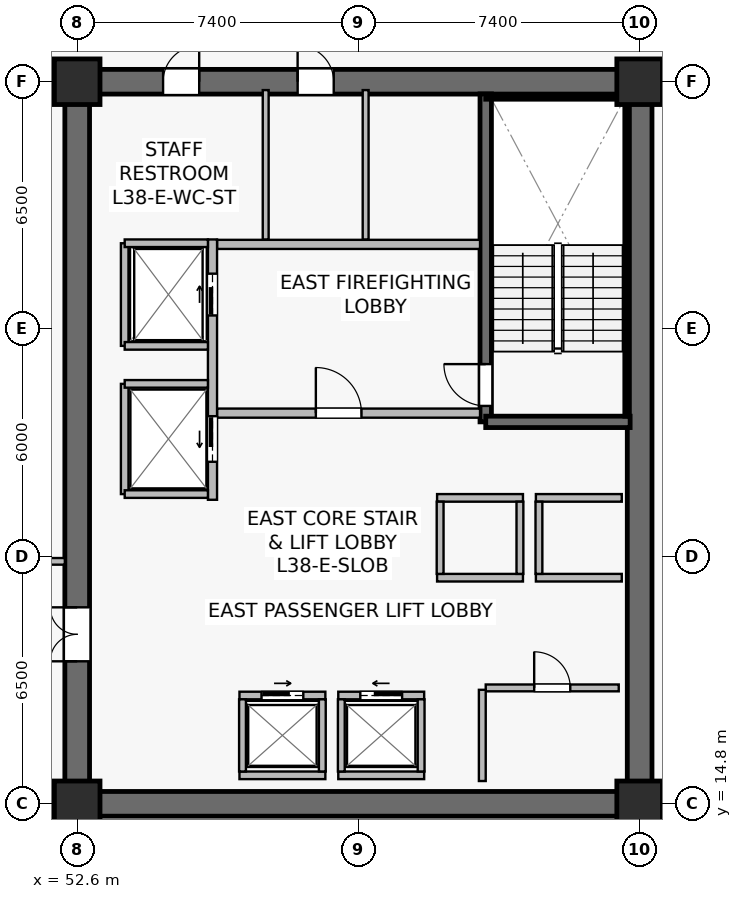
"""IFC4 building model, lengths in metres.
Left out: names, types, materials, properties, quantities, classifications, styles, units other than length and angle.
Written with IfcOpenShell. Run it as: python <this file> out.ifc"""

import sys

from ifc_helpers import new_model, si_unit, direction, frame, frame_2d, origin, origin_2d, place, context, subcontext, project, spatial, rectangle, extrude, source, transform, mapped, element, fill, save


model = new_model("IFC4")
c1 = context("Model", 3, precision=1e-05, world=origin(), true_north=direction((0.0, 1.0)))
c2 = subcontext(c1, "Body", "Model", "MODEL_VIEW")
j1 = project(units=[si_unit("LENGTHUNIT", "METRE"), si_unit("PLANEANGLEUNIT", "RADIAN")], contexts=[c1])
p1 = place(None, origin())
s1 = spatial("IfcSite", under=j1, at=p1, CompositionType="ELEMENT")
p2 = place(p1, origin())
s2 = spatial("IfcBuilding", under=s1, at=p2, CompositionType="ELEMENT")
p3 = place(p2, frame((0.0, 0.0, 158.4)))
s3 = spatial("IfcBuildingStorey", under=s2, at=p3, CompositionType="ELEMENT", Elevation=158.4)
p4 = place(p3, frame((52.275, 14.8, 0.0), z_axis=(0.0, 0.0, 1.0), x_axis=(1.0, 0.0, 0.0)))
e1 = element("IfcWall", 1, at=p4, inside=s3, PredefinedType="SHEAR", context=c2, shape_type="SweptSolid", body=[
    extrude(rectangle(XDim=15.45, YDim=0.65, at=frame_2d((7.725, 0.0))), origin(), (0.0, 0.0, 1.0), 3.79),
])
p5 = place(p3, frame((52.275, 33.8, 0.0), z_axis=(0.0, 0.0, 1.0), x_axis=(1.0, 0.0, 0.0)))
e2 = element("IfcWall", 2, at=p5, inside=s3, PredefinedType="SHEAR", context=c2, shape_type="SweptSolid", body=[
    extrude(rectangle(XDim=15.45, YDim=0.65, at=frame_2d((7.725, 0.0))), origin(), (0.0, 0.0, 1.0), 3.79),
])
p6 = place(p5, frame((6.125, 0.0, 0.0)))
e3 = element("IfcOpeningElement", 3, at=p6, cuts=e2, PredefinedType="OPENING", context=c2, shape_type="SweptSolid", body=[
    extrude(rectangle(XDim=0.95, YDim=2.15, at=frame_2d((0.475, 1.075))), frame((0.0, 0.335, 0.0), z_axis=(0.0, -1.0, 0.0), x_axis=(1.0, 0.0, 0.0)), (0.0, 0.0, 1.0), 0.67),
])
p7 = place(p5, frame((2.585, 0.0, 0.0)))
e4 = element("IfcOpeningElement", 4, at=p7, cuts=e2, PredefinedType="OPENING", context=c2, shape_type="SweptSolid", body=[
    extrude(rectangle(XDim=0.95, YDim=2.15, at=frame_2d((0.475, 1.075))), frame((0.0, 0.335, 0.0), z_axis=(0.0, -1.0, 0.0), x_axis=(1.0, 0.0, 0.0)), (0.0, 0.0, 1.0), 0.67),
])
p8 = place(p3, frame((52.6, 15.125, 0.0), z_axis=(0.0, 0.0, 1.0), x_axis=(0.0, 1.0, 0.0)))
e5 = element("IfcWall", 5, at=p8, inside=s3, PredefinedType="SHEAR", context=c2, shape_type="SweptSolid", body=[
    extrude(rectangle(XDim=18.35, YDim=0.65, at=frame_2d((9.175, 0.0))), origin(), (0.0, 0.0, 1.0), 3.79),
])
p9 = place(p8, frame((3.425, 0.0, 0.0)))
e6 = element("IfcOpeningElement", 6, at=p9, cuts=e5, PredefinedType="OPENING", context=c2, shape_type="SweptSolid", body=[
    extrude(rectangle(XDim=1.42, YDim=2.2, at=frame_2d((0.71, 1.1))), frame((0.0, 0.335, 0.0), z_axis=(0.0, -1.0, 0.0), x_axis=(1.0, 0.0, 0.0)), (0.0, 0.0, 1.0), 0.67),
])
p10 = place(p3, frame((67.4, 15.125, 0.0), z_axis=(0.0, 0.0, 1.0), x_axis=(0.0, 1.0, 0.0)))
e7 = element("IfcWall", 7, at=p10, inside=s3, PredefinedType="SHEAR", context=c2, shape_type="SweptSolid", body=[
    extrude(rectangle(XDim=18.35, YDim=0.65, at=frame_2d((9.175, 0.0))), origin(), (0.0, 0.0, 1.0), 3.79),
])
p11 = place(p3, frame((63.35, 24.85, 0.0), z_axis=(0.0, 0.0, 1.0), x_axis=(0.0, 1.0, 0.0)))
e8 = element("IfcWall", 8, at=p11, inside=s3, PredefinedType="SHEAR", context=c2, shape_type="SweptSolid", body=[
    extrude(rectangle(XDim=8.63, YDim=0.3, at=frame_2d((4.315, 0.0))), origin(), (0.0, 0.0, 1.0), 3.79),
])
p12 = place(p11, frame((0.42, 0.0, 0.0)))
e9 = element("IfcOpeningElement", 9, at=p12, cuts=e8, PredefinedType="OPENING", context=c2, shape_type="SweptSolid", body=[
    extrude(rectangle(XDim=1.1, YDim=2.15, at=frame_2d((0.55, 1.075))), frame((0.0, 0.16, 0.0), z_axis=(0.0, -1.0, 0.0), x_axis=(1.0, 0.0, 0.0)), (0.0, 0.0, 1.0), 0.32),
])
p13 = place(p3, frame((63.35, 24.85, 0.0), z_axis=(0.0, 0.0, 1.0), x_axis=(1.0, 0.0, 0.0)))
e10 = element("IfcWall", 10, at=p13, inside=s3, PredefinedType="SHEAR", context=c2, shape_type="SweptSolid", body=[
    extrude(rectangle(XDim=3.8, YDim=0.3, at=frame_2d((1.9, 0.0))), origin(), (0.0, 0.0, 1.0), 3.79),
])
p14 = place(p3, frame((63.35, 33.4, 0.0), z_axis=(0.0, 0.0, 1.0), x_axis=(1.0, 0.0, 0.0)))
e11 = element("IfcWall", 11, at=p14, inside=s3, PredefinedType="SOLIDWALL", context=c2, shape_type="SweptSolid", body=[
    extrude(rectangle(XDim=3.72, YDim=0.12, at=frame_2d((1.86, 0.0))), origin(), (0.0, 0.0, 1.0), 3.79),
])
p15 = place(p3, frame((67.07, 25.0, 0.0), z_axis=(0.0, 0.0, 1.0), x_axis=(0.0, 1.0, 0.0)))
e12 = element("IfcWall", 12, at=p15, inside=s3, PredefinedType="SOLIDWALL", context=c2, shape_type="SweptSolid", body=[
    extrude(rectangle(XDim=8.32, YDim=0.12, at=frame_2d((4.16, 0.0))), origin(), (0.0, 0.0, 1.0), 3.79),
])
m1 = source(origin(), c2, "Body", "SweptSolid", [
    extrude(rectangle(XDim=1.2, YDim=1.2, at=origin_2d()), origin(), (0.0, 0.0, 1.0), 4.1),
])
for number, where, z_axis, x_axis in (
    (13, (52.6, 14.8, 0.0), (0.0, 0.0, 1.0), (1.0, 0.0, 0.0)),
    (14, (67.4, 14.8, 0.0), (0.0, 0.0, 1.0), (1.0, 0.0, 0.0)),
    (15, (52.6, 33.8, 0.0), (0.0, 0.0, 1.0), (1.0, 0.0, 0.0)),
    (16, (67.4, 33.8, 0.0), (0.0, 0.0, 1.0), (1.0, 0.0, 0.0)),
):
    element("IfcColumn", number, at=place(p3, frame(where, z_axis=z_axis, x_axis=x_axis)), inside=s3, PredefinedType="COLUMN", context=c2, shape_type="MappedRepresentation", body=[
        mapped(m1, transform((0.0, 0.0, 0.0), scale=1.0)),
    ])
p16 = place(p3, frame((56.28, 25.08, 0.0), z_axis=(0.0, 0.0, 1.0), x_axis=(1.0, 0.0, 0.0)))
e17 = element("IfcWall", 17, at=p16, inside=s3, PredefinedType="SOLIDWALL", context=c2, shape_type="SweptSolid", body=[
    extrude(rectangle(XDim=6.92, YDim=0.24, at=frame_2d((3.46, 0.0))), origin(), (0.0, 0.0, 1.0), 3.187),
])
p17 = place(p16, frame((2.6, 0.0, 0.0)))
e18 = element("IfcOpeningElement", 18, at=p17, cuts=e17, PredefinedType="OPENING", context=c2, shape_type="SweptSolid", body=[
    extrude(rectangle(XDim=1.2, YDim=2.16, at=frame_2d((0.6, 1.08))), frame((0.0, 0.13, 0.0), z_axis=(0.0, -1.0, 0.0), x_axis=(1.0, 0.0, 0.0)), (0.0, 0.0, 1.0), 0.26),
])
p18 = place(p3, frame((56.28, 29.52, 0.0), z_axis=(0.0, 0.0, 1.0), x_axis=(1.0, 0.0, 0.0)))
e19 = element("IfcWall", 19, at=p18, inside=s3, PredefinedType="SOLIDWALL", context=c2, shape_type="SweptSolid", body=[
    extrude(rectangle(XDim=6.92, YDim=0.24, at=frame_2d((3.46, 0.0))), origin(), (0.0, 0.0, 1.0), 3.187),
])
p19 = place(p3, frame((56.16, 22.8, 0.0), z_axis=(0.0, 0.0, 1.0), x_axis=(0.0, 1.0, 0.0)))
e20 = element("IfcWall", 20, at=p19, inside=s3, PredefinedType="SOLIDWALL", context=c2, shape_type="SweptSolid", body=[
    extrude(rectangle(XDim=6.85, YDim=0.24, at=frame_2d((3.425, 0.0))), origin(), (0.0, 0.0, 1.0), 2.875),
])
p20 = place(p19, frame((4.85, 0.0, 0.0)))
e21 = element("IfcOpeningElement", 21, at=p20, cuts=e20, PredefinedType="OPENING", context=c2, shape_type="SweptSolid", body=[
    extrude(rectangle(XDim=1.1, YDim=2.22, at=frame_2d((0.55, 1.11))), frame((0.0, 0.13, 0.0), z_axis=(0.0, -1.0, 0.0), x_axis=(1.0, 0.0, 0.0)), (0.0, 0.0, 1.0), 0.26),
])
p21 = place(p19, frame((1.0, 0.0, 0.0)))
e22 = element("IfcOpeningElement", 22, at=p21, cuts=e20, PredefinedType="OPENING", context=c2, shape_type="SweptSolid", body=[
    extrude(rectangle(XDim=1.2, YDim=2.22, at=frame_2d((0.6, 1.11))), frame((0.0, 0.13, 0.0), z_axis=(0.0, -1.0, 0.0), x_axis=(1.0, 0.0, 0.0)), (0.0, 0.0, 1.0), 0.26),
])
p22 = place(p3, frame((59.47, 17.65, 0.0), z_axis=(0.0, 0.0, 1.0), x_axis=(1.0, 0.0, 0.0)))
e23 = element("IfcWall", 23, at=p22, inside=s3, PredefinedType="SOLIDWALL", context=c2, shape_type="SweptSolid", body=[
    extrude(rectangle(XDim=2.26, YDim=0.2, at=frame_2d((1.13, 0.0))), origin(), (0.0, 0.0, 1.0), 3.187),
])
p23 = place(p22, frame((0.58, 0.0, 0.0)))
e24 = element("IfcOpeningElement", 24, at=p23, cuts=e23, PredefinedType="OPENING", context=c2, shape_type="SweptSolid", body=[
    extrude(rectangle(XDim=1.1, YDim=2.22, at=frame_2d((0.55, 1.11))), frame((0.0, 0.11, 0.0), z_axis=(0.0, -1.0, 0.0), x_axis=(1.0, 0.0, 0.0)), (0.0, 0.0, 1.0), 0.22),
])
p24 = place(p3, frame((59.47, 15.55, 0.0), z_axis=(0.0, 0.0, 1.0), x_axis=(1.0, 0.0, 0.0)))
e25 = element("IfcWall", 25, at=p24, inside=s3, PredefinedType="SOLIDWALL", context=c2, shape_type="SweptSolid", body=[
    extrude(rectangle(XDim=2.26, YDim=0.2, at=frame_2d((1.13, 0.0))), origin(), (0.0, 0.0, 1.0), 3.187),
])
for number, where, z_axis, x_axis in (
    (26, (59.55, 15.65, 0.0), (0.0, 0.0, 1.0), (0.0, 1.0, 0.0)),
    (27, (61.65, 15.65, 0.0), (0.0, 0.0, 1.0), (0.0, 1.0, 0.0)),
):
    element("IfcWall", number, at=place(p3, frame(where, z_axis=z_axis, x_axis=x_axis)), inside=s3, PredefinedType="SOLIDWALL", context=c2, shape_type="SweptSolid", body=[
        extrude(rectangle(XDim=1.9, YDim=0.18, at=frame_2d((0.95, 0.0))), origin(), (0.0, 0.0, 1.0), 3.79),
    ])
p25 = place(p3, frame((56.87, 17.65, 0.0), z_axis=(0.0, 0.0, 1.0), x_axis=(1.0, 0.0, 0.0)))
e28 = element("IfcWall", 28, at=p25, inside=s3, PredefinedType="SOLIDWALL", context=c2, shape_type="SweptSolid", body=[
    extrude(rectangle(XDim=2.26, YDim=0.2, at=frame_2d((1.13, 0.0))), origin(), (0.0, 0.0, 1.0), 3.79),
])
p26 = place(p25, frame((0.58, 0.0, 0.0)))
e29 = element("IfcOpeningElement", 29, at=p26, cuts=e28, PredefinedType="OPENING", context=c2, shape_type="SweptSolid", body=[
    extrude(rectangle(XDim=1.1, YDim=2.22, at=frame_2d((0.55, 1.11))), frame((0.0, 0.11, 0.0), z_axis=(0.0, -1.0, 0.0), x_axis=(1.0, 0.0, 0.0)), (0.0, 0.0, 1.0), 0.22),
])
p27 = place(p3, frame((56.87, 15.55, 0.0), z_axis=(0.0, 0.0, 1.0), x_axis=(1.0, 0.0, 0.0)))
e30 = element("IfcWall", 30, at=p27, inside=s3, PredefinedType="SOLIDWALL", context=c2, shape_type="SweptSolid", body=[
    extrude(rectangle(XDim=2.26, YDim=0.2, at=frame_2d((1.13, 0.0))), origin(), (0.0, 0.0, 1.0), 3.79),
])
for number, where, z_axis, x_axis in (
    (31, (56.95, 15.65, 0.0), (0.0, 0.0, 1.0), (0.0, 1.0, 0.0)),
    (32, (59.05, 15.65, 0.0), (0.0, 0.0, 1.0), (0.0, 1.0, 0.0)),
):
    element("IfcWall", number, at=place(p3, frame(where, z_axis=z_axis, x_axis=x_axis)), inside=s3, PredefinedType="SOLIDWALL", context=c2, shape_type="SweptSolid", body=[
        extrude(rectangle(XDim=1.9, YDim=0.18, at=frame_2d((0.95, 0.0))), origin(), (0.0, 0.0, 1.0), 3.79),
    ])
for number, where, z_axis, x_axis in (
    (33, (64.67, 20.75, 0.0), (0.0, 0.0, 1.0), (1.0, 0.0, 0.0)),
    (34, (64.67, 22.85, 0.0), (0.0, 0.0, 1.0), (1.0, 0.0, 0.0)),
):
    element("IfcWall", number, at=place(p3, frame(where, z_axis=z_axis, x_axis=x_axis)), inside=s3, PredefinedType="SOLIDWALL", context=c2, shape_type="SweptSolid", body=[
        extrude(rectangle(XDim=2.26, YDim=0.2, at=frame_2d((1.13, 0.0))), origin(), (0.0, 0.0, 1.0), 3.79),
    ])
p28 = place(p3, frame((64.75, 20.85, 0.0), z_axis=(0.0, 0.0, 1.0), x_axis=(0.0, 1.0, 0.0)))
e35 = element("IfcWall", 35, at=p28, inside=s3, PredefinedType="SOLIDWALL", context=c2, shape_type="SweptSolid", body=[
    extrude(rectangle(XDim=1.9, YDim=0.18, at=frame_2d((0.95, 0.0))), origin(), (0.0, 0.0, 1.0), 3.79),
])
for number, where, z_axis, x_axis in (
    (36, (62.07, 20.75, 0.0), (0.0, 0.0, 1.0), (1.0, 0.0, 0.0)),
    (37, (62.07, 22.85, 0.0), (0.0, 0.0, 1.0), (1.0, 0.0, 0.0)),
):
    element("IfcWall", number, at=place(p3, frame(where, z_axis=z_axis, x_axis=x_axis)), inside=s3, PredefinedType="SOLIDWALL", context=c2, shape_type="SweptSolid", body=[
        extrude(rectangle(XDim=2.26, YDim=0.2, at=frame_2d((1.13, 0.0))), origin(), (0.0, 0.0, 1.0), 3.79),
    ])
for number, where, z_axis, x_axis in (
    (38, (62.15, 20.85, 0.0), (0.0, 0.0, 1.0), (0.0, 1.0, 0.0)),
    (39, (64.25, 20.85, 0.0), (0.0, 0.0, 1.0), (0.0, 1.0, 0.0)),
):
    element("IfcWall", number, at=place(p3, frame(where, z_axis=z_axis, x_axis=x_axis)), inside=s3, PredefinedType="SOLIDWALL", context=c2, shape_type="SweptSolid", body=[
        extrude(rectangle(XDim=1.9, YDim=0.18, at=frame_2d((0.95, 0.0))), origin(), (0.0, 0.0, 1.0), 3.79),
    ])
p29 = place(p3, frame((53.85, 26.85, 0.0), z_axis=(0.0, 0.0, 1.0), x_axis=(0.0, 1.0, 0.0)))
e40 = element("IfcWall", 40, at=p29, inside=s3, PredefinedType="SOLIDWALL", context=c2, shape_type="SweptSolid", body=[
    extrude(rectangle(XDim=2.7, YDim=0.2, at=frame_2d((1.35, 0.0))), origin(), (0.0, 0.0, 1.0), 3.79),
])
p30 = place(p3, frame((53.85, 29.55, 0.0), z_axis=(0.0, 0.0, 1.0), x_axis=(1.0, 0.0, 0.0)))
e41 = element("IfcWall", 41, at=p30, inside=s3, PredefinedType="SOLIDWALL", context=c2, shape_type="SweptSolid", body=[
    extrude(rectangle(XDim=2.19, YDim=0.2, at=frame_2d((1.095, 0.0))), origin(), (0.0, 0.0, 1.0), 3.79),
])
p31 = place(p3, frame((53.85, 26.85, 0.0), z_axis=(0.0, 0.0, 1.0), x_axis=(1.0, 0.0, 0.0)))
e42 = element("IfcWall", 42, at=p31, inside=s3, PredefinedType="SOLIDWALL", context=c2, shape_type="SweptSolid", body=[
    extrude(rectangle(XDim=2.19, YDim=0.2, at=frame_2d((1.095, 0.0))), origin(), (0.0, 0.0, 1.0), 3.187),
])
p32 = place(p3, frame((53.85, 22.95, 0.0), z_axis=(0.0, 0.0, 1.0), x_axis=(0.0, 1.0, 0.0)))
e43 = element("IfcWall", 43, at=p32, inside=s3, PredefinedType="SOLIDWALL", context=c2, shape_type="SweptSolid", body=[
    extrude(rectangle(XDim=2.9, YDim=0.2, at=frame_2d((1.45, 0.0))), origin(), (0.0, 0.0, 1.0), 2.875),
])
for number, where, z_axis, x_axis in (
    (44, (53.85, 25.85, 0.0), (0.0, 0.0, 1.0), (1.0, 0.0, 0.0)),
    (45, (53.85, 22.95, 0.0), (0.0, 0.0, 1.0), (1.0, 0.0, 0.0)),
):
    element("IfcWall", number, at=place(p3, frame(where, z_axis=z_axis, x_axis=x_axis)), inside=s3, PredefinedType="SOLIDWALL", context=c2, shape_type="SweptSolid", body=[
        extrude(rectangle(XDim=2.19, YDim=0.2, at=frame_2d((1.095, 0.0))), origin(), (0.0, 0.0, 1.0), 3.79),
    ])
p33 = place(p3, frame((63.35, 17.85, 0.0), z_axis=(0.0, 0.0, 1.0), x_axis=(1.0, 0.0, 0.0)))
e46 = element("IfcWall", 46, at=p33, inside=s3, PredefinedType="SOLIDWALL", context=c2, shape_type="SweptSolid", body=[
    extrude(rectangle(XDim=3.5, YDim=0.18, at=frame_2d((1.75, 0.0))), origin(), (0.0, 0.0, 1.0), 3.79),
])
p34 = place(p33, frame((1.275, 0.0, 0.0)))
e47 = element("IfcOpeningElement", 47, at=p34, cuts=e46, PredefinedType="OPENING", context=c2, shape_type="SweptSolid", body=[
    extrude(rectangle(XDim=0.95, YDim=2.15, at=frame_2d((0.475, 1.075))), frame((0.0, 0.1, 0.0), z_axis=(0.0, -1.0, 0.0), x_axis=(1.0, 0.0, 0.0)), (0.0, 0.0, 1.0), 0.2),
])
p35 = place(p3, frame((63.26, 15.4, 0.0), z_axis=(0.0, 0.0, 1.0), x_axis=(0.0, 1.0, 0.0)))
e48 = element("IfcWall", 48, at=p35, inside=s3, PredefinedType="SOLIDWALL", context=c2, shape_type="SweptSolid", body=[
    extrude(rectangle(XDim=2.4, YDim=0.18, at=frame_2d((1.2, 0.0))), origin(), (0.0, 0.0, 1.0), 3.79),
])
p36 = place(p3, frame((60.19, 29.65, 0.0), z_axis=(0.0, 0.0, 1.0), x_axis=(0.0, 1.0, 0.0)))
e49 = element("IfcWall", 49, at=p36, inside=s3, PredefinedType="PLUMBINGWALL", context=c2, shape_type="SweptSolid", body=[
    extrude(rectangle(XDim=3.93, YDim=0.155, at=frame_2d((1.965, 0.0))), origin(), (0.0, 0.0, 1.0), 3.187),
])
p37 = place(p3, frame((57.56, 29.65, 0.0), z_axis=(0.0, 0.0, 1.0), x_axis=(0.0, 1.0, 0.0)))
e50 = element("IfcWall", 50, at=p37, inside=s3, PredefinedType="PLUMBINGWALL", context=c2, shape_type="SweptSolid", body=[
    extrude(rectangle(XDim=3.93, YDim=0.155, at=frame_2d((1.965, 0.0))), origin(), (0.0, 0.0, 1.0), 3.79),
])
p38 = place(p3, frame((48.3, 34.26, 0.0), z_axis=(0.0, 0.0, 1.0), x_axis=(1.0, 0.0, 0.0)))
e51 = element("IfcWall", 51, at=p38, inside=s3, PredefinedType="PARTITIONING", context=c2, shape_type="SweptSolid", body=[
    extrude(rectangle(XDim=3.975, YDim=0.175, at=frame_2d((1.987, 0.0))), origin(), (0.0, 0.0, 1.0), 3.475),
])
p39 = place(p3, frame((48.3, 21.18, 0.0), z_axis=(0.0, 0.0, 1.0), x_axis=(1.0, 0.0, 0.0)))
e52 = element("IfcWall", 52, at=p39, inside=s3, PredefinedType="PARTITIONING", context=c2, shape_type="SweptSolid", body=[
    extrude(rectangle(XDim=3.975, YDim=0.175, at=frame_2d((1.987, 0.0))), origin(), (0.0, 0.0, 1.0), 3.79),
])
p40 = place(p39, frame((1.35, 0.0, 0.0)))
e53 = element("IfcOpeningElement", 53, at=p40, cuts=e52, PredefinedType="OPENING", context=c2, shape_type="SweptSolid", body=[
    extrude(rectangle(XDim=0.95, YDim=2.15, at=frame_2d((0.475, 1.075))), frame((0.0, 0.098, 0.0), z_axis=(0.0, -1.0, 0.0), x_axis=(1.0, 0.0, 0.0)), (0.0, 0.0, 1.0), 0.195),
])
m2 = source(origin(), c2, "Body", "SweptSolid", [
    extrude(rectangle(XDim=1.1, YDim=2.15, at=frame_2d((0.55, 1.075))), frame((0.0, 0.025, 0.0), z_axis=(0.0, -1.0, 0.0), x_axis=(1.0, 0.0, 0.0)), (0.0, 0.0, 1.0), 0.05),
])
p41 = place(p12, origin())
e54 = element("IfcDoor", 54, at=p41, inside=s3, OperationType="SINGLE_SWING_RIGHT", PredefinedType="DOOR", context=c2, shape_type="MappedRepresentation", body=[
    mapped(m2, transform((0.0, 0.0, 0.0), scale=1.0)),
])
fill(e9, e54)
m3 = source(origin(), c2, "Body", "SweptSolid", [
    extrude(rectangle(XDim=1.2, YDim=2.16, at=frame_2d((0.6, 1.08))), frame((0.0, 0.025, 0.0), z_axis=(0.0, -1.0, 0.0), x_axis=(1.0, 0.0, 0.0)), (0.0, 0.0, 1.0), 0.05),
])
p42 = place(p17, origin())
e55 = element("IfcDoor", 55, at=p42, inside=s3, OperationType="SINGLE_SWING_LEFT", PredefinedType="DOOR", context=c2, shape_type="MappedRepresentation", body=[
    mapped(m3, transform((0.0, 0.0, 0.0), scale=1.0)),
])
fill(e18, e55)
m4 = source(origin(), c2, "Body", "SweptSolid", [
    extrude(rectangle(XDim=1.1, YDim=2.22, at=frame_2d((0.55, 1.11))), frame((0.0, 0.025, 0.0), z_axis=(0.0, -1.0, 0.0), x_axis=(1.0, 0.0, 0.0)), (0.0, 0.0, 1.0), 0.05),
])
p43 = place(p23, origin())
e56 = element("IfcDoor", 56, at=p43, inside=s3, OperationType="SLIDING_TO_LEFT", PredefinedType="USERDEFINED", context=c2, shape_type="MappedRepresentation", body=[
    mapped(m4, transform((0.0, 0.0, 0.0), scale=1.0)),
])
fill(e24, e56)
p44 = place(p26, origin())
e57 = element("IfcDoor", 57, at=p44, inside=s3, OperationType="SLIDING_TO_RIGHT", PredefinedType="USERDEFINED", context=c2, shape_type="MappedRepresentation", body=[
    mapped(m4, transform((0.0, 0.0, 0.0), scale=1.0)),
])
fill(e29, e57)
p45 = place(p20, origin())
e58 = element("IfcDoor", 58, at=p45, inside=s3, OperationType="SLIDING_TO_RIGHT", PredefinedType="USERDEFINED", context=c2, shape_type="MappedRepresentation", body=[
    mapped(m4, transform((0.0, 0.0, 0.0), scale=1.0)),
])
fill(e21, e58)
m5 = source(origin(), c2, "Body", "SweptSolid", [
    extrude(rectangle(XDim=1.2, YDim=2.22, at=frame_2d((0.6, 1.11))), frame((0.0, 0.025, 0.0), z_axis=(0.0, -1.0, 0.0), x_axis=(1.0, 0.0, 0.0)), (0.0, 0.0, 1.0), 0.05),
])
p46 = place(p21, origin())
e59 = element("IfcDoor", 59, at=p46, inside=s3, OperationType="SLIDING_TO_LEFT", PredefinedType="USERDEFINED", context=c2, shape_type="MappedRepresentation", body=[
    mapped(m5, transform((0.0, 0.0, 0.0), scale=1.0)),
])
fill(e22, e59)
m6 = source(origin(), c2, "Body", "SweptSolid", [
    extrude(rectangle(XDim=0.95, YDim=2.15, at=frame_2d((0.475, 1.075))), frame((0.0, 0.025, 0.0), z_axis=(0.0, -1.0, 0.0), x_axis=(1.0, 0.0, 0.0)), (0.0, 0.0, 1.0), 0.05),
])
p47 = place(p34, origin())
e60 = element("IfcDoor", 60, at=p47, inside=s3, OperationType="SINGLE_SWING_LEFT", PredefinedType="DOOR", context=c2, shape_type="MappedRepresentation", body=[
    mapped(m6, transform((0.0, 0.0, 0.0), scale=1.0)),
])
fill(e47, e60)
m7 = source(origin(), c2, "Body", "SweptSolid", [
    extrude(rectangle(XDim=1.42, YDim=2.2, at=frame_2d((0.71, 1.1))), frame((0.0, 0.025, 0.0), z_axis=(0.0, -1.0, 0.0), x_axis=(1.0, 0.0, 0.0)), (0.0, 0.0, 1.0), 0.05),
])
p48 = place(p9, origin())
e61 = element("IfcDoor", 61, at=p48, inside=s3, OperationType="DOUBLE_DOOR_SINGLE_SWING", PredefinedType="DOOR", context=c2, shape_type="MappedRepresentation", body=[
    mapped(m7, transform((0.0, 0.0, 0.0), scale=1.0)),
])
fill(e6, e61)
p49 = place(p6, origin())
e62 = element("IfcDoor", 62, at=p49, inside=s3, OperationType="SINGLE_SWING_LEFT", PredefinedType="DOOR", context=c2, shape_type="MappedRepresentation", body=[
    mapped(m6, transform((0.0, 0.0, 0.0), scale=1.0)),
])
fill(e3, e62)
p50 = place(p7, origin())
e63 = element("IfcDoor", 63, at=p50, inside=s3, OperationType="SINGLE_SWING_RIGHT", PredefinedType="DOOR", context=c2, shape_type="MappedRepresentation", body=[
    mapped(m6, transform((0.0, 0.0, 0.0), scale=1.0)),
])
fill(e4, e63)
save(model, sys.argv[1])
